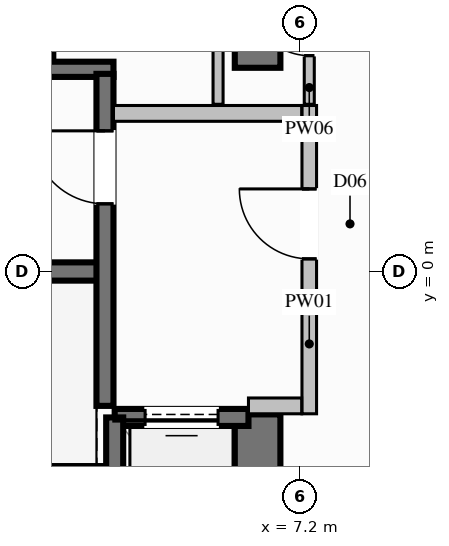
"""IFC4 building model, lengths in metres.
Left out: names, types, materials, properties, quantities, classifications, styles, units other than length and angle.
Written with IfcOpenShell. Run it as: python <this file> out.ifc"""

import sys

from ifc_helpers import new_model, si_unit, direction, frame, frame_2d, origin, place, context, subcontext, project, spatial, rectangle, extrude, element, fill, save


model = new_model("IFC4")
c1 = context("Model", 3, precision=1e-05, world=origin(), true_north=direction((0.0, 1.0)))
c2 = subcontext(c1, "Body", "Model", "MODEL_VIEW")
j1 = project(units=[si_unit("LENGTHUNIT", "METRE"), si_unit("PLANEANGLEUNIT", "RADIAN")], contexts=[c1])
p1 = place(None, origin())
s1 = spatial("IfcSite", under=j1, at=p1, CompositionType="ELEMENT")
p2 = place(p1, origin())
s2 = spatial("IfcBuilding", under=s1, at=p2, CompositionType="ELEMENT")
p3 = place(p2, frame((0.0, 0.0, 32.0)))
s3 = spatial("IfcBuildingStorey", under=s2, at=p3, CompositionType="ELEMENT", Elevation=32.0)
p4 = place(p3, frame((-3.99, 0.0, 0.0), z_axis=(0.0, 0.0, 1.0), x_axis=(1.0, 0.0, 0.0)))
e1 = element("IfcWall", 1, at=p4, inside=s3, PredefinedType="SHEAR", context=c2, shape_type="SweptSolid", body=[
    extrude(rectangle(XDim=7.98, YDim=0.3, at=frame_2d((3.99, 0.0))), origin(), (0.0, 0.0, 1.0), 3.6),
])
for number, where, z_axis, x_axis in (
    (2, (-4.13, -3.325, 0.0), (0.0, 0.0, 1.0), (1.0, 0.0, 0.0)),
    (3, (-4.13, 3.325, 0.0), (0.0, 0.0, 1.0), (1.0, 0.0, 0.0)),
):
    element("IfcWall", number, at=place(p3, frame(where, z_axis=z_axis, x_axis=x_axis)), inside=s3, PredefinedType="SOLIDWALL", context=c2, shape_type="SweptSolid", body=[
        extrude(rectangle(XDim=8.26, YDim=0.25, at=frame_2d((4.13, 0.0))), origin(), (0.0, 0.0, 1.0), 3.6),
    ])
p5 = place(p3, frame((6.5, -6.475, 0.0), z_axis=(0.0, 0.0, 1.0), x_axis=(0.0, 1.0, 0.0)))
e4 = element("IfcWall", 4, at=p5, inside=s3, PredefinedType="SHEAR", context=c2, shape_type="SweptSolid", body=[
    extrude(rectangle(XDim=4.125, YDim=0.75, at=frame_2d((2.062, 0.0))), origin(), (0.0, 0.0, 1.0), 3.6),
])
p6 = place(p3, frame((6.5, 3.35, 0.0), z_axis=(0.0, 0.0, 1.0), x_axis=(0.0, 1.0, 0.0)))
e5 = element("IfcWall", 5, at=p6, inside=s3, PredefinedType="SHEAR", context=c2, shape_type="SweptSolid", body=[
    extrude(rectangle(XDim=3.125, YDim=0.75, at=frame_2d((1.562, 0.0))), origin(), (0.0, 0.0, 1.0), 3.6),
])
p7 = place(p3, frame((3.0, 3.5, 0.0), z_axis=(0.0, 0.0, 1.0), x_axis=(0.0, 1.0, 0.0)))
e6 = element("IfcWall", 6, at=p7, inside=s3, PredefinedType="SOLIDWALL", context=c2, shape_type="SweptSolid", body=[
    extrude(rectangle(XDim=2.5, YDim=0.28, at=frame_2d((1.25, 0.0))), origin(), (0.0, 0.0, 1.0), 3.34),
])
p8 = place(p3, frame((6.35, -2.4, 0.0), z_axis=(0.0, 0.0, 1.0), x_axis=(-1.0, 0.0, 0.0)))
e7 = element("IfcWall", 7, at=p8, inside=s3, PredefinedType="SOLIDWALL", context=c2, shape_type="SweptSolid", body=[
    extrude(rectangle(XDim=2.2, YDim=0.28, at=frame_2d((1.1, 0.0))), origin(), (0.0, 0.0, 1.0), 3.34),
])
p9 = place(p8, frame((0.5, 0.0, 0.0)))
e8 = element("IfcOpeningElement", 8, at=p9, cuts=e7, PredefinedType="OPENING", context=c2, shape_type="SweptSolid", body=[
    extrude(rectangle(XDim=1.2, YDim=2.2, at=frame_2d((0.6, 1.1))), frame((0.0, 0.15, 0.0), z_axis=(0.0, -1.0, 0.0), x_axis=(1.0, 0.0, 0.0)), (0.0, 0.0, 1.0), 0.3),
])
p10 = place(p3, frame((4.15, -2.4, 0.0), z_axis=(0.0, 0.0, 1.0), x_axis=(0.0, -1.0, 0.0)))
e9 = element("IfcWall", 9, at=p10, inside=s3, PredefinedType="SOLIDWALL", context=c2, shape_type="SweptSolid", body=[
    extrude(rectangle(XDim=2.7, YDim=0.28, at=frame_2d((1.35, 0.0))), origin(), (0.0, 0.0, 1.0), 3.34),
])
p11 = place(p3, frame((3.99, -2.21, 0.0), z_axis=(0.0, 0.0, 1.0), x_axis=(0.0, 1.0, 0.0)))
e10 = element("IfcWall", 10, at=p11, inside=s3, PredefinedType="SOLIDWALL", context=c2, shape_type="SweptSolid", body=[
    extrude(rectangle(XDim=5.46, YDim=0.28, at=frame_2d((2.73, 0.0))), origin(), (0.0, 0.0, 1.0), 3.34),
])
p12 = place(p11, frame((3.323, 0.0, 0.0)))
e11 = element("IfcOpeningElement", 11, at=p12, cuts=e10, PredefinedType="OPENING", context=c2, shape_type="SweptSolid", body=[
    extrude(rectangle(XDim=1.2, YDim=2.2, at=frame_2d((0.6, 1.1))), frame((0.0, 0.15, 0.0), z_axis=(0.0, -1.0, 0.0), x_axis=(1.0, 0.0, 0.0)), (0.0, 0.0, 1.0), 0.3),
])
p13 = place(p3, frame((7.35, -2.34, 0.0), z_axis=(0.0, 0.0, 1.0), x_axis=(0.0, 1.0, 0.0)))
e12 = element("IfcWall", 12, at=p13, inside=s3, PredefinedType="PARTITIONING", context=c2, shape_type="SweptSolid", body=[
    extrude(rectangle(XDim=5.07, YDim=0.24, at=frame_2d((2.535, 0.0))), origin(), (0.0, 0.0, 1.0), 2.425),
])
p14 = place(p13, frame((2.548, 0.0, 0.0)))
e13 = element("IfcOpeningElement", 13, at=p14, cuts=e12, PredefinedType="OPENING", context=c2, shape_type="SweptSolid", body=[
    extrude(rectangle(XDim=1.15, YDim=2.2, at=frame_2d((0.575, 1.1))), frame((0.0, 0.13, 0.0), z_axis=(0.0, -1.0, 0.0), x_axis=(1.0, 0.0, 0.0)), (0.0, 0.0, 1.0), 0.26),
])
p15 = place(p3, frame((6.35, -2.21, 0.0), z_axis=(0.0, 0.0, 1.0), x_axis=(1.0, 0.0, 0.0)))
e14 = element("IfcWall", 14, at=p15, inside=s3, PredefinedType="PARTITIONING", context=c2, shape_type="SweptSolid", body=[
    extrude(rectangle(XDim=0.875, YDim=0.26, at=frame_2d((0.438, 0.0))), origin(), (0.0, 0.0, 1.0), 3.34),
])
p16 = place(p3, frame((4.13, 2.6, 0.0), z_axis=(0.0, 0.0, 1.0), x_axis=(1.0, 0.0, 0.0)))
e15 = element("IfcWall", 15, at=p16, inside=s3, PredefinedType="PARTITIONING", context=c2, shape_type="SweptSolid", body=[
    extrude(rectangle(XDim=3.095, YDim=0.26, at=frame_2d((1.548, 0.0))), origin(), (0.0, 0.0, 1.0), 3.34),
])
p17 = place(p3, frame((7.35, 2.75, 0.0), z_axis=(0.0, 0.0, 1.0), x_axis=(0.0, 1.0, 0.0)))
e16 = element("IfcWall", 16, at=p17, inside=s3, PredefinedType="PARTITIONING", context=c2, shape_type="SweptSolid", body=[
    extrude(rectangle(XDim=2.55, YDim=0.165, at=frame_2d((1.275, 0.0))), origin(), (0.0, 0.0, 1.0), 3.34),
])
p18 = place(p17, frame((0.8, 0.0, 0.0)))
e17 = element("IfcOpeningElement", 17, at=p18, cuts=e16, PredefinedType="OPENING", context=c2, shape_type="SweptSolid", body=[
    extrude(rectangle(XDim=0.95, YDim=2.1, at=frame_2d((0.475, 1.05))), frame((0.0, 0.093, 0.0), z_axis=(0.0, -1.0, 0.0), x_axis=(1.0, 0.0, 0.0)), (0.0, 0.0, 1.0), 0.185),
])
p19 = place(p3, frame((5.85, 5.3, 0.0), z_axis=(0.0, 0.0, 1.0), x_axis=(0.0, -1.0, 0.0)))
e18 = element("IfcWall", 18, at=p19, inside=s3, PredefinedType="PARTITIONING", context=c2, shape_type="SweptSolid", body=[
    extrude(rectangle(XDim=2.55, YDim=0.165, at=frame_2d((1.275, 0.0))), origin(), (0.0, 0.0, 1.0), 2.425),
])
p20 = place(p9, origin())
e19 = element("IfcDoor", 19, at=p20, inside=s3, OperationType="SLIDING_TO_LEFT", PredefinedType="DOOR", context=c2, shape_type="SweptSolid", body=[
    extrude(rectangle(XDim=1.2, YDim=2.2, at=frame_2d((0.6, 1.1))), frame((0.0, 0.025, 0.0), z_axis=(0.0, -1.0, 0.0), x_axis=(1.0, 0.0, 0.0)), (0.0, 0.0, 1.0), 0.05),
])
fill(e8, e19)
p21 = place(p12, origin())
e20 = element("IfcDoor", 20, at=p21, inside=s3, OperationType="SINGLE_SWING_RIGHT", PredefinedType="DOOR", context=c2, shape_type="SweptSolid", body=[
    extrude(rectangle(XDim=1.2, YDim=2.2, at=frame_2d((0.6, 1.1))), frame((0.0, 0.025, 0.0), z_axis=(0.0, -1.0, 0.0), x_axis=(1.0, 0.0, 0.0)), (0.0, 0.0, 1.0), 0.05),
])
fill(e11, e20)
p22 = place(p14, origin())
e21 = element("IfcDoor", 21, at=p22, inside=s3, OperationType="SINGLE_SWING_RIGHT", PredefinedType="DOOR", context=c2, shape_type="SweptSolid", body=[
    extrude(rectangle(XDim=1.15, YDim=2.2, at=frame_2d((0.575, 1.1))), frame((0.0, 0.025, 0.0), z_axis=(0.0, -1.0, 0.0), x_axis=(1.0, 0.0, 0.0)), (0.0, 0.0, 1.0), 0.05),
])
fill(e13, e21)
p23 = place(p18, origin())
e22 = element("IfcDoor", 22, at=p23, inside=s3, OperationType="SINGLE_SWING_RIGHT", PredefinedType="DOOR", context=c2, shape_type="SweptSolid", body=[
    extrude(rectangle(XDim=0.95, YDim=2.1, at=frame_2d((0.475, 1.05))), frame((0.0, 0.025, 0.0), z_axis=(0.0, -1.0, 0.0), x_axis=(1.0, 0.0, 0.0)), (0.0, 0.0, 1.0), 0.05),
])
fill(e17, e22)
save(model, sys.argv[1])
